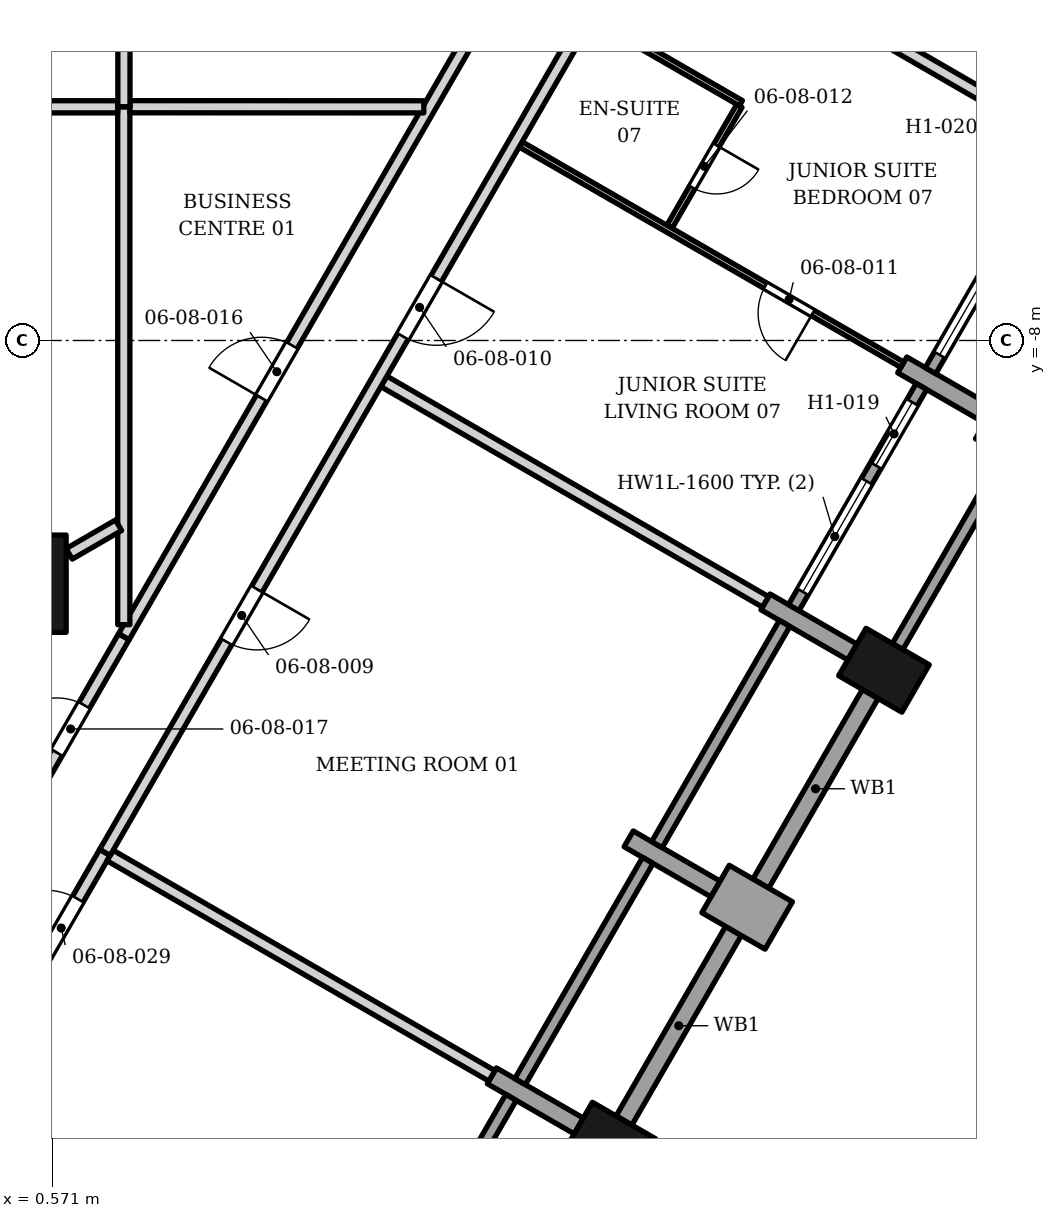
"""IFC4 building model, lengths in metres.
Left out: names, types, materials, properties, quantities, classifications, styles, units other than length and angle.
Written with IfcOpenShell. Run it as: python <this file> out.ifc"""

import sys

from ifc_helpers import new_model, si_unit, direction, frame, frame_2d, origin, origin_2d, place, context, subcontext, project, spatial, rectangle, extrude, element, fill, save


model = new_model("IFC4")
c1 = context("Model", 3, precision=1e-05, world=origin(), true_north=direction((0.0, 1.0)))
c2 = subcontext(c1, "Body", "Model", "MODEL_VIEW")
j1 = project(units=[si_unit("LENGTHUNIT", "METRE"), si_unit("PLANEANGLEUNIT", "RADIAN")], contexts=[c1])
p1 = place(None, origin())
s1 = spatial("IfcSite", under=j1, at=p1, CompositionType="ELEMENT")
p2 = place(p1, origin())
s2 = spatial("IfcBuilding", under=s1, at=p2, CompositionType="ELEMENT")
p3 = place(p2, frame((0.0, 0.0, 46.0)))
s3 = spatial("IfcBuildingStorey", under=s2, at=p3, CompositionType="ELEMENT", Elevation=46.0)
p4 = place(p3, frame((0.0, -12.0, 0.0), z_axis=(0.0, 0.0, 1.0), x_axis=(1.0, 0.0, 0.0)))
e1 = element("IfcColumn", 1, at=p4, inside=s3, PredefinedType="COLUMN", context=c2, shape_type="SweptSolid", body=[
    extrude(rectangle(XDim=1.6, YDim=1.6, at=origin_2d()), origin(), (0.0, 0.0, 1.0), 3.4),
])
for number, where, z_axis, x_axis in (
    (2, (9.75, -21.218, 0.0), (0.0, 0.0, 1.0), (0.5, 0.866, 0.0)),
    (3, (14.25, -13.423, 0.0), (0.0, 0.0, 1.0), (0.5, 0.866, 0.0)),
):
    element("IfcColumn", number, at=place(p3, frame(where, z_axis=z_axis, x_axis=x_axis)), inside=s3, PredefinedType="COLUMN", context=c2, shape_type="SweptSolid", body=[
        extrude(rectangle(XDim=0.9, YDim=1.2, at=origin_2d()), origin(), (0.0, 0.0, 1.0), 3.4),
    ])
p5 = place(p3, frame((7.802, -20.093, 0.0), z_axis=(0.0, 0.0, 1.0), x_axis=(0.865976140824, -0.500085316245, 0.0)))
e4 = element("IfcWall", 4, at=p5, inside=s3, PredefinedType="SOLIDWALL", context=c2, shape_type="SweptSolid", body=[
    extrude(rectangle(XDim=1.65, YDim=0.3, at=frame_2d((0.825, 0.0))), origin(), (0.0, 0.0, 1.0), 2.65),
])
p6 = place(p3, frame((12.52, -17.621, 0.0), z_axis=(0.0, 0.0, 1.0), x_axis=(-0.865955154139, 0.50012165622, 0.0)))
e5 = element("IfcWall", 5, at=p6, inside=s3, PredefinedType="SOLIDWALL", context=c2, shape_type="SweptSolid", body=[
    extrude(rectangle(XDim=1.2, YDim=0.9, at=frame_2d((0.6, 0.0))), origin(), (0.0, 0.0, 1.0), 2.63),
])
p7 = place(p3, frame((11.48, -17.021, 0.0), z_axis=(0.0, 0.0, 1.0), x_axis=(-0.866040211805, 0.499974350878, 0.0)))
e6 = element("IfcWall", 6, at=p7, inside=s3, PredefinedType="SOLIDWALL", context=c2, shape_type="SweptSolid", body=[
    extrude(rectangle(XDim=1.65, YDim=0.3, at=frame_2d((0.825, 0.0))), origin(), (0.0, 0.0, 1.0), 2.65),
])
p8 = place(p3, frame((13.73, -13.123, 0.0), z_axis=(0.0, 0.0, 1.0), x_axis=(-0.866003217194, 0.500038426333, 0.0)))
e7 = element("IfcWall", 7, at=p8, inside=s3, PredefinedType="SOLIDWALL", context=c2, shape_type="SweptSolid", body=[
    extrude(rectangle(XDim=1.65, YDim=0.3, at=frame_2d((0.825, 0.0))), origin(), (0.0, 0.0, 1.0), 2.302),
])
p9 = place(p3, frame((17.02, -9.826, 0.0), z_axis=(0.0, 0.0, 1.0), x_axis=(-0.866043267704, 0.499969057507, 0.0)))
e8 = element("IfcWall", 8, at=p9, inside=s3, PredefinedType="SOLIDWALL", context=c2, shape_type="SweptSolid", body=[
    extrude(rectangle(XDim=1.2, YDim=0.9, at=frame_2d((0.6, 0.0))), origin(), (0.0, 0.0, 1.0), 2.63),
])
p10 = place(p3, frame((15.98, -9.226, 0.0), z_axis=(0.0, 0.0, 1.0), x_axis=(-0.866040211805, 0.499974350878, 0.0)))
e9 = element("IfcWall", 9, at=p10, inside=s3, PredefinedType="SOLIDWALL", context=c2, shape_type="SweptSolid", body=[
    extrude(rectangle(XDim=1.65, YDim=0.3, at=frame_2d((0.825, 0.0))), origin(), (0.0, 0.0, 1.0), 2.65),
])
p11 = place(p3, frame((6.016, -24.085, 0.0), z_axis=(0.0, 0.0, 1.0), x_axis=(0.500027713859, 0.866009402589, 0.0)))
e10 = element("IfcWall", 10, at=p11, inside=s3, PredefinedType="ELEMENTEDWALL", context=c2, shape_type="SweptSolid", body=[
    extrude(rectangle(XDim=4.2, YDim=0.2, at=frame_2d((2.1, 0.0))), origin(), (0.0, 0.0, 1.0), 2.65),
])
p12 = place(p3, frame((9.975, -20.828, 0.0), z_axis=(0.0, 0.0, 1.0), x_axis=(0.499961193289, 0.866047807691, 0.0)))
e11 = element("IfcWall", 11, at=p12, inside=s3, PredefinedType="SOLIDWALL", context=c2, shape_type="SweptSolid", body=[
    extrude(rectangle(XDim=3.6, YDim=0.3, at=frame_2d((1.8, 0.0))), origin(), (0.0, 0.0, 1.0), 2.63),
])
p13 = place(p3, frame((8.266, -20.188, 0.0), z_axis=(0.0, 0.0, 1.0), x_axis=(0.500002543286, 0.866023935413, 0.0)))
e12 = element("IfcWall", 12, at=p13, inside=s3, PredefinedType="ELEMENTEDWALL", context=c2, shape_type="SweptSolid", body=[
    extrude(rectangle(XDim=4.2, YDim=0.2, at=frame_2d((2.1, 0.0))), origin(), (0.0, 0.0, 1.0), 2.65),
])
p14 = place(p3, frame((12.225, -16.931, 0.0), z_axis=(0.0, 0.0, 1.0), x_axis=(0.499931829785, 0.866064758299, 0.0)))
e13 = element("IfcWall", 13, at=p14, inside=s3, PredefinedType="SOLIDWALL", context=c2, shape_type="SweptSolid", body=[
    extrude(rectangle(XDim=3.6, YDim=0.3, at=frame_2d((1.8, 0.0))), origin(), (0.0, 0.0, 1.0), 2.63),
])
p15 = place(p3, frame((10.516, -16.291, 0.0), z_axis=(0.0, 0.0, 1.0), x_axis=(0.500027713859, 0.866009402589, 0.0)))
e14 = element("IfcWall", 14, at=p15, inside=s3, PredefinedType="ELEMENTEDWALL", context=c2, shape_type="SweptSolid", body=[
    extrude(rectangle(XDim=4.2, YDim=0.2, at=frame_2d((2.1, 0.0))), origin(), (0.0, 0.0, 1.0), 2.65),
])
p16 = place(p3, frame((14.475, -13.034, 0.0), z_axis=(0.0, 0.0, 1.0), x_axis=(0.499961193289, 0.866047807691, 0.0)))
e15 = element("IfcWall", 15, at=p16, inside=s3, PredefinedType="SOLIDWALL", context=c2, shape_type="SweptSolid", body=[
    extrude(rectangle(XDim=3.6, YDim=0.2, at=frame_2d((1.8, 0.0))), origin(), (0.0, 0.0, 1.0), 2.302),
])
p17 = place(p3, frame((12.766, -12.394, 0.0), z_axis=(0.0, 0.0, 1.0), x_axis=(0.500002543286, 0.866023935413, 0.0)))
e16 = element("IfcWall", 16, at=p17, inside=s3, PredefinedType="ELEMENTEDWALL", context=c2, shape_type="SweptSolid", body=[
    extrude(rectangle(XDim=4.2, YDim=0.2, at=frame_2d((2.1, 0.0))), origin(), (0.0, 0.0, 1.0), 2.302),
])
p18 = place(p17, frame((0.3, 0.0, 0.6)))
e17 = element("IfcOpeningElement", 17, at=p18, cuts=e16, PredefinedType="OPENING", context=c2, shape_type="SweptSolid", body=[
    extrude(rectangle(XDim=2.1, YDim=1.6, at=frame_2d((1.05, 0.8))), frame((0.0, 0.11, 0.0), z_axis=(0.0, -1.0, 0.0), x_axis=(1.0, 0.0, 0.0)), (0.0, 0.0, 1.0), 0.22),
])
p19 = place(p17, frame((2.7, 0.0, 0.0)))
e18 = element("IfcOpeningElement", 18, at=p19, cuts=e16, PredefinedType="OPENING", context=c2, shape_type="SweptSolid", body=[
    extrude(rectangle(XDim=1.2, YDim=2.2, at=frame_2d((0.6, 1.1))), frame((0.0, 0.11, 0.0), z_axis=(0.0, -1.0, 0.0), x_axis=(1.0, 0.0, 0.0)), (0.0, 0.0, 1.0), 0.22),
])
p20 = place(p3, frame((15.016, -8.496, 0.0), z_axis=(0.0, 0.0, 1.0), x_axis=(0.500027713859, 0.866009402589, 0.0)))
e19 = element("IfcWall", 19, at=p20, inside=s3, PredefinedType="ELEMENTEDWALL", context=c2, shape_type="SweptSolid", body=[
    extrude(rectangle(XDim=4.2, YDim=0.2, at=frame_2d((2.1, 0.0))), origin(), (0.0, 0.0, 1.0), 2.65),
])
p21 = place(p20, frame((0.3, 0.0, 0.6)))
e20 = element("IfcOpeningElement", 20, at=p21, cuts=e19, PredefinedType="OPENING", context=c2, shape_type="SweptSolid", body=[
    extrude(rectangle(XDim=2.1, YDim=1.8, at=frame_2d((1.05, 0.9))), frame((0.0, 0.11, 0.0), z_axis=(0.0, -1.0, 0.0), x_axis=(1.0, 0.0, 0.0)), (0.0, 0.0, 1.0), 0.22),
])
p22 = place(p20, frame((2.7, 0.0, 0.0)))
e21 = element("IfcOpeningElement", 21, at=p22, cuts=e19, PredefinedType="OPENING", context=c2, shape_type="SweptSolid", body=[
    extrude(rectangle(XDim=1.2, YDim=2.4, at=frame_2d((0.6, 1.2))), frame((0.0, 0.11, 0.0), z_axis=(0.0, -1.0, 0.0), x_axis=(1.0, 0.0, 0.0)), (0.0, 0.0, 1.0), 0.22),
])
p23 = place(p3, frame((0.0, -18.906, 0.0), z_axis=(0.0, 0.0, 1.0), x_axis=(0.50046312627, 0.865757852545, 0.0)))
e22 = element("IfcWall", 22, at=p23, inside=s3, PredefinedType="PARTITIONING", context=c2, shape_type="SweptSolid", body=[
    extrude(rectangle(XDim=2.872, YDim=0.2, at=frame_2d((1.436, 0.0))), origin(), (0.0, 0.0, 1.0), 2.628),
])
p24 = place(p23, frame((0.886, 0.0, 0.0)))
e23 = element("IfcOpeningElement", 23, at=p24, cuts=e22, PredefinedType="OPENING", context=c2, shape_type="SweptSolid", body=[
    extrude(rectangle(XDim=1.1, YDim=2.1, at=frame_2d((0.55, 1.05))), frame((0.0, 0.11, 0.0), z_axis=(0.0, -1.0, 0.0), x_axis=(1.0, 0.0, 0.0)), (0.0, 0.0, 1.0), 0.22),
])
p25 = place(p3, frame((1.522, -16.469, 0.0), z_axis=(0.0, 0.0, 1.0), x_axis=(0.866125590059, -0.499826432119, 0.0)))
e24 = element("IfcWall", 24, at=p25, inside=s3, PredefinedType="PARTITIONING", context=c2, shape_type="SweptSolid", body=[
    extrude(rectangle(XDim=7.25, YDim=0.2, at=frame_2d((3.625, 0.0))), origin(), (0.0, 0.0, 1.0), 2.552),
])
p26 = place(p3, frame((0.05, -15.818, 0.0), z_axis=(0.0, 0.0, 1.0), x_axis=(0.499521489101, 0.866301495974, 0.0)))
e25 = element("IfcWall", 25, at=p26, inside=s3, PredefinedType="PARTITIONING", context=c2, shape_type="SweptSolid", body=[
    extrude(rectangle(XDim=3.401, YDim=0.2, at=frame_2d((1.7, 0.0))), origin(), (0.0, 0.0, 1.0), 2.628),
])
p27 = place(p26, frame((1.2, 0.0, 0.0)))
e26 = element("IfcOpeningElement", 26, at=p27, cuts=e25, PredefinedType="OPENING", context=c2, shape_type="SweptSolid", body=[
    extrude(rectangle(XDim=0.9, YDim=2.1, at=frame_2d((0.45, 1.05))), frame((0.0, 0.11, 0.0), z_axis=(0.0, -1.0, 0.0), x_axis=(1.0, 0.0, 0.0)), (0.0, 0.0, 1.0), 0.22),
])
p28 = place(p3, frame((1.75, -12.87, 0.0), z_axis=(0.0, 0.0, 1.0), x_axis=(0.499999309361, 0.866025802525, 0.0)))
e27 = element("IfcWall", 27, at=p28, inside=s3, PredefinedType="PARTITIONING", context=c2, shape_type="SweptSolid", body=[
    extrude(rectangle(XDim=19.134, YDim=0.2, at=frame_2d((9.567, 0.0))), origin(), (0.0, 0.0, 1.0), 2.302),
])
p29 = place(p28, frame((14.098, 0.0, 0.0)))
e28 = element("IfcOpeningElement", 28, at=p29, cuts=e27, PredefinedType="OPENING", context=c2, shape_type="SweptSolid", body=[
    extrude(rectangle(XDim=1.0, YDim=2.1, at=frame_2d((0.5, 1.05))), frame((0.0, 0.11, 0.0), z_axis=(0.0, -1.0, 0.0), x_axis=(1.0, 0.0, 0.0)), (0.0, 0.0, 1.0), 0.22),
])
p30 = place(p28, frame((4.53, 0.0, 0.0)))
e29 = element("IfcOpeningElement", 29, at=p30, cuts=e27, PredefinedType="OPENING", context=c2, shape_type="SweptSolid", body=[
    extrude(rectangle(XDim=1.0, YDim=2.1, at=frame_2d((0.5, 1.05))), frame((0.0, 0.11, 0.0), z_axis=(0.0, -1.0, 0.0), x_axis=(1.0, 0.0, 0.0)), (0.0, 0.0, 1.0), 0.22),
])
p31 = place(p3, frame((1.748, -12.674, 0.0), z_axis=(0.0, 0.0, 1.0), x_axis=(0.0, 1.0, 0.0)))
e30 = element("IfcWall", 30, at=p31, inside=s3, PredefinedType="PARTITIONING", context=c2, shape_type="SweptSolid", body=[
    extrude(rectangle(XDim=8.516, YDim=0.2, at=frame_2d((4.258, 0.0))), origin(), (0.0, 0.0, 1.0), 2.302),
])
p32 = place(p3, frame((0.85, -11.509, 0.0), z_axis=(0.0, 0.0, 1.0), x_axis=(0.865248014814, 0.501344066345, 0.0)))
e31 = element("IfcWall", 31, at=p32, inside=s3, PredefinedType="PARTITIONING", context=c2, shape_type="SweptSolid", body=[
    extrude(rectangle(XDim=0.938, YDim=0.2, at=frame_2d((0.469, 0.0))), origin(), (0.0, 0.0, 1.0), 3.23),
])
p33 = place(p3, frame((6.024, -8.672, 0.0), z_axis=(0.0, 0.0, 1.0), x_axis=(0.865914666804, -0.500191753045, 0.0)))
e32 = element("IfcWall", 32, at=p33, inside=s3, PredefinedType="PARTITIONING", context=c2, shape_type="SweptSolid", body=[
    extrude(rectangle(XDim=7.25, YDim=0.2, at=frame_2d((3.625, 0.0))), origin(), (0.0, 0.0, 1.0), 2.302),
])
p34 = place(p3, frame((10.722, -6.13, 0.0), z_axis=(0.0, 0.0, 1.0), x_axis=(0.500617411337, 0.865668647617, 0.0)))
e33 = element("IfcWall", 33, at=p34, inside=s3, PredefinedType="PARTITIONING", context=c2, shape_type="SweptSolid", body=[
    extrude(rectangle(XDim=2.298, YDim=0.1, at=frame_2d((1.149, 0.0))), origin(), (0.0, 0.0, 1.0), 3.23),
])
p35 = place(p34, frame((0.748, 0.0, 0.0)))
e34 = element("IfcOpeningElement", 34, at=p35, cuts=e33, PredefinedType="OPENING", context=c2, shape_type="SweptSolid", body=[
    extrude(rectangle(XDim=0.8, YDim=2.1, at=frame_2d((0.4, 1.05))), frame((0.0, 0.06, 0.0), z_axis=(0.0, -1.0, 0.0), x_axis=(1.0, 0.0, 0.0)), (0.0, 0.0, 1.0), 0.12),
])
p36 = place(p3, frame((8.274, -4.775, 0.0), z_axis=(0.0, 0.0, 1.0), x_axis=(0.866035857012, -0.499981894041, 0.0)))
e35 = element("IfcWall", 35, at=p36, inside=s3, PredefinedType="PARTITIONING", context=c2, shape_type="SweptSolid", body=[
    extrude(rectangle(XDim=7.25, YDim=0.1, at=frame_2d((3.625, 0.0))), origin(), (0.0, 0.0, 1.0), 2.384),
])
p37 = place(p36, frame((4.65, 0.0, 0.0)))
e36 = element("IfcOpeningElement", 36, at=p37, cuts=e35, PredefinedType="OPENING", context=c2, shape_type="SweptSolid", body=[
    extrude(rectangle(XDim=0.9, YDim=2.1, at=frame_2d((0.45, 1.05))), frame((0.0, 0.06, 0.0), z_axis=(0.0, -1.0, 0.0), x_axis=(1.0, 0.0, 0.0)), (0.0, 0.0, 1.0), 0.12),
])
p38 = place(p3, frame((-6.683, -4.156, 0.0), z_axis=(0.0, 0.0, 1.0), x_axis=(0.99999997896, -0.000205134212, 0.0)))
e37 = element("IfcWall", 37, at=p38, inside=s3, PredefinedType="PARTITIONING", context=c2, shape_type="SweptSolid", body=[
    extrude(rectangle(XDim=8.331, YDim=0.2, at=frame_2d((4.166, 0.0))), origin(), (0.0, 0.0, 1.0), 3.23),
])
p39 = place(p3, frame((1.85, -4.156, 0.0), z_axis=(0.0, 0.0, 1.0), x_axis=(0.999999937456, -0.000353678232, 0.0)))
e38 = element("IfcWall", 38, at=p39, inside=s3, PredefinedType="PARTITIONING", context=c2, shape_type="SweptSolid", body=[
    extrude(rectangle(XDim=4.832, YDim=0.2, at=frame_2d((2.416, 0.0))), origin(), (0.0, 0.0, 1.0), 3.23),
])
p40 = place(p3, frame((9.472, -2.699, 0.0), z_axis=(0.0, 0.0, 1.0), x_axis=(0.866288634608, -0.499543793424, 0.0)))
e39 = element("IfcWall", 39, at=p40, inside=s3, PredefinedType="PARTITIONING", context=c2, shape_type="SweptSolid", body=[
    extrude(rectangle(XDim=2.8, YDim=0.1, at=frame_2d((1.4, 0.0))), origin(), (0.0, 0.0, 1.0), 3.23),
])
p41 = place(p3, frame((10.525, -0.878, 0.0), z_axis=(0.0, 0.0, 1.0), x_axis=(0.865907869998, -0.500203519255, 0.0)))
e40 = element("IfcWall", 40, at=p41, inside=s3, PredefinedType="PARTITIONING", context=c2, shape_type="SweptSolid", body=[
    extrude(rectangle(XDim=7.248, YDim=0.2, at=frame_2d((3.624, 0.0))), origin(), (0.0, 0.0, 1.0), 2.384),
])
p42 = place(p3, frame((1.438, -16.419, 0.0), z_axis=(0.0, 0.0, 1.0), x_axis=(0.499996012009, 0.86602770624, 0.0)))
e41 = element("IfcWall", 41, at=p42, inside=s3, PredefinedType="PARTITIONING", context=c2, shape_type="SweptSolid", body=[
    extrude(rectangle(XDim=18.0, YDim=0.2, at=frame_2d((9.0, 0.0))), origin(), (0.0, 0.0, 1.0), 2.302),
])
p43 = place(p42, frame((4.0, 0.0, 0.0)))
e42 = element("IfcOpeningElement", 42, at=p43, cuts=e41, PredefinedType="OPENING", context=c2, shape_type="SweptSolid", body=[
    extrude(rectangle(XDim=1.0, YDim=2.1, at=frame_2d((0.5, 1.05))), frame((0.0, 0.11, 0.0), z_axis=(0.0, -1.0, 0.0), x_axis=(1.0, 0.0, 0.0)), (0.0, 0.0, 1.0), 0.22),
])
p44 = place(p42, frame((9.8, 0.0, 0.0)))
e43 = element("IfcOpeningElement", 43, at=p44, cuts=e41, PredefinedType="OPENING", context=c2, shape_type="SweptSolid", body=[
    extrude(rectangle(XDim=1.1, YDim=2.1, at=frame_2d((0.55, 1.05))), frame((0.0, 0.11, 0.0), z_axis=(0.0, -1.0, 0.0), x_axis=(1.0, 0.0, 0.0)), (0.0, 0.0, 1.0), 0.22),
])
p45 = place(p3, frame((1.75, -4.156, 0.0), z_axis=(0.0, 0.0, 1.0), x_axis=(0.000258617496, 0.999999966558, 0.0)))
e44 = element("IfcWall", 44, at=p45, inside=s3, PredefinedType="PARTITIONING", context=c2, shape_type="SweptSolid", body=[
    extrude(rectangle(XDim=6.608, YDim=0.2, at=frame_2d((3.304, 0.0))), origin(), (0.0, 0.0, 1.0), 3.23),
])
p46 = place(p18, origin())
e45 = element("IfcWindow", 45, at=p46, inside=s3, PartitioningType="SINGLE_PANEL", PredefinedType="WINDOW", context=c2, shape_type="SweptSolid", body=[
    extrude(rectangle(XDim=2.1, YDim=1.6, at=frame_2d((1.05, 0.8))), frame((0.0, 0.03, 0.0), z_axis=(0.0, -1.0, 0.0), x_axis=(1.0, 0.0, 0.0)), (0.0, 0.0, 1.0), 0.06),
])
fill(e17, e45)
p47 = place(p19, origin())
e46 = element("IfcDoor", 46, at=p47, inside=s3, OperationType="SINGLE_SWING_LEFT", PredefinedType="DOOR", context=c2, shape_type="SweptSolid", body=[
    extrude(rectangle(XDim=1.2, YDim=2.2, at=frame_2d((0.6, 1.1))), frame((0.0, 0.025, 0.0), z_axis=(0.0, -1.0, 0.0), x_axis=(1.0, 0.0, 0.0)), (0.0, 0.0, 1.0), 0.05),
])
fill(e18, e46)
p48 = place(p21, origin())
e47 = element("IfcWindow", 47, at=p48, inside=s3, PartitioningType="SINGLE_PANEL", PredefinedType="WINDOW", context=c2, shape_type="SweptSolid", body=[
    extrude(rectangle(XDim=2.1, YDim=1.8, at=frame_2d((1.05, 0.9))), frame((0.0, 0.03, 0.0), z_axis=(0.0, -1.0, 0.0), x_axis=(1.0, 0.0, 0.0)), (0.0, 0.0, 1.0), 0.06),
])
fill(e20, e47)
p49 = place(p43, origin())
e48 = element("IfcDoor", 48, at=p49, inside=s3, OperationType="SINGLE_SWING_RIGHT", PredefinedType="DOOR", context=c2, shape_type="SweptSolid", body=[
    extrude(rectangle(XDim=1.0, YDim=2.1, at=frame_2d((0.5, 1.05))), frame((0.0, 0.025, 0.0), z_axis=(0.0, -1.0, 0.0), x_axis=(1.0, 0.0, 0.0)), (0.0, 0.0, 1.0), 0.05),
])
fill(e42, e48)
p50 = place(p44, origin())
e49 = element("IfcDoor", 49, at=p50, inside=s3, OperationType="SINGLE_SWING_RIGHT", PredefinedType="DOOR", context=c2, shape_type="SweptSolid", body=[
    extrude(rectangle(XDim=1.1, YDim=2.1, at=frame_2d((0.55, 1.05))), frame((0.0, 0.025, 0.0), z_axis=(0.0, -1.0, 0.0), x_axis=(1.0, 0.0, 0.0)), (0.0, 0.0, 1.0), 0.05),
])
fill(e43, e49)
p51 = place(p37, origin())
e50 = element("IfcDoor", 50, at=p51, inside=s3, OperationType="SINGLE_SWING_RIGHT", PredefinedType="DOOR", context=c2, shape_type="SweptSolid", body=[
    extrude(rectangle(XDim=0.9, YDim=2.1, at=frame_2d((0.45, 1.05))), frame((0.0, 0.025, 0.0), z_axis=(0.0, -1.0, 0.0), x_axis=(1.0, 0.0, 0.0)), (0.0, 0.0, 1.0), 0.05),
])
fill(e36, e50)
p52 = place(p35, origin())
e51 = element("IfcDoor", 51, at=p52, inside=s3, OperationType="SINGLE_SWING_RIGHT", PredefinedType="DOOR", context=c2, shape_type="SweptSolid", body=[
    extrude(rectangle(XDim=0.8, YDim=2.1, at=frame_2d((0.4, 1.05))), frame((0.0, 0.025, 0.0), z_axis=(0.0, -1.0, 0.0), x_axis=(1.0, 0.0, 0.0)), (0.0, 0.0, 1.0), 0.05),
])
fill(e34, e51)
p53 = place(p30, origin())
e52 = element("IfcDoor", 52, at=p53, inside=s3, OperationType="SINGLE_SWING_LEFT", PredefinedType="DOOR", context=c2, shape_type="SweptSolid", body=[
    extrude(rectangle(XDim=1.0, YDim=2.1, at=frame_2d((0.5, 1.05))), frame((0.0, 0.025, 0.0), z_axis=(0.0, -1.0, 0.0), x_axis=(1.0, 0.0, 0.0)), (0.0, 0.0, 1.0), 0.05),
])
fill(e29, e52)
p54 = place(p27, origin())
e53 = element("IfcDoor", 53, at=p54, inside=s3, OperationType="SINGLE_SWING_LEFT", PredefinedType="DOOR", context=c2, shape_type="SweptSolid", body=[
    extrude(rectangle(XDim=0.9, YDim=2.1, at=frame_2d((0.45, 1.05))), frame((0.0, 0.025, 0.0), z_axis=(0.0, -1.0, 0.0), x_axis=(1.0, 0.0, 0.0)), (0.0, 0.0, 1.0), 0.05),
])
fill(e26, e53)
p55 = place(p24, origin())
e54 = element("IfcDoor", 54, at=p55, inside=s3, OperationType="SINGLE_SWING_LEFT", PredefinedType="DOOR", context=c2, shape_type="SweptSolid", body=[
    extrude(rectangle(XDim=1.1, YDim=2.1, at=frame_2d((0.55, 1.05))), frame((0.0, 0.025, 0.0), z_axis=(0.0, -1.0, 0.0), x_axis=(1.0, 0.0, 0.0)), (0.0, 0.0, 1.0), 0.05),
])
fill(e23, e54)
save(model, sys.argv[1])
